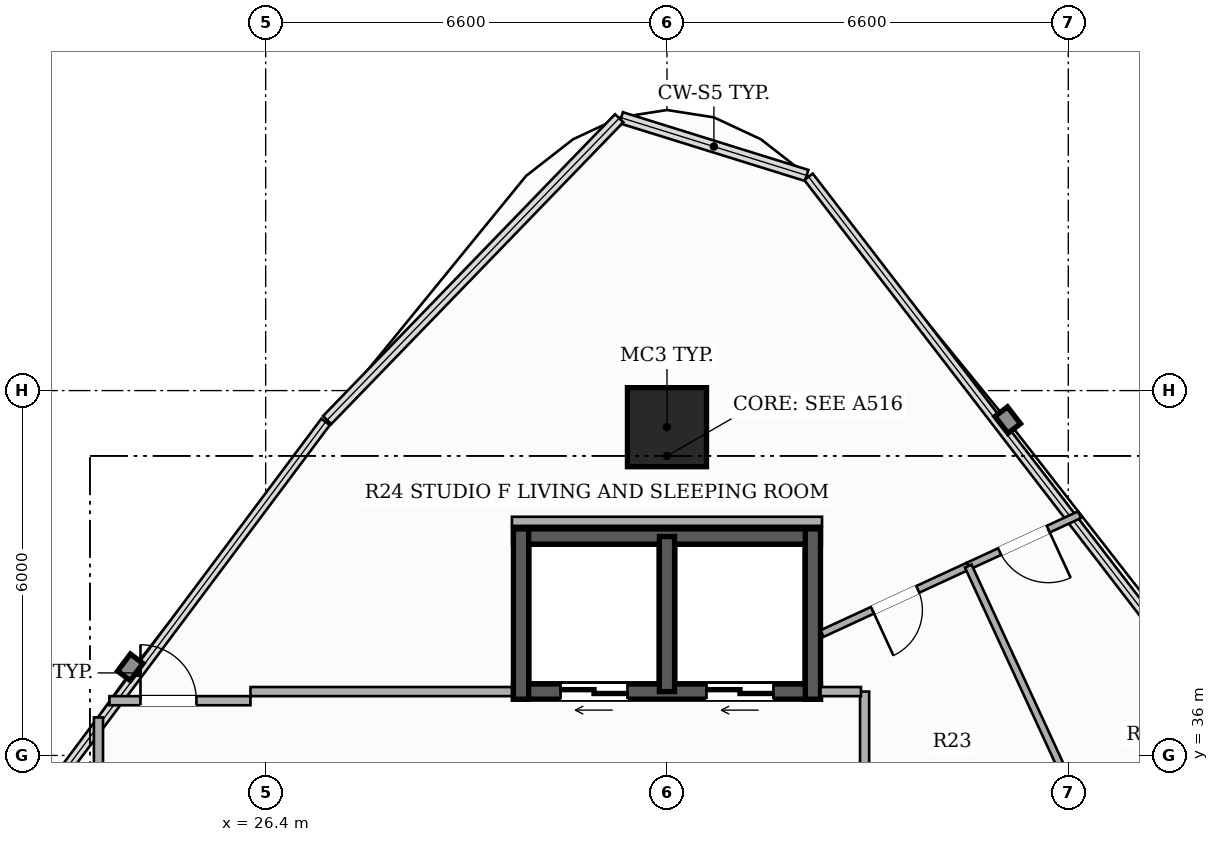
"""IFC4 building model, lengths in metres.
Left out: names, types, materials, properties, quantities, classifications, styles, units other than length and angle.
Written with IfcOpenShell. Run it as: python <this file> out.ifc"""

import sys

from ifc_helpers import new_model, si_unit, direction, frame, frame_2d, origin, origin_2d, place, context, subcontext, project, spatial, rectangle, hollow_rectangle, extrude, element, fill, save


model = new_model("IFC4")
c1 = context("Model", 3, precision=1e-05, world=origin(), true_north=direction((0.0, 1.0)))
c2 = subcontext(c1, "Body", "Model", "MODEL_VIEW")
j1 = project(units=[si_unit("LENGTHUNIT", "METRE"), si_unit("PLANEANGLEUNIT", "RADIAN")], contexts=[c1])
p1 = place(None, origin())
s1 = spatial("IfcSite", under=j1, at=p1, CompositionType="ELEMENT")
p2 = place(p1, origin())
s2 = spatial("IfcBuilding", under=s1, at=p2, CompositionType="ELEMENT")
p3 = place(p2, frame((0.0, 0.0, 199.7)))
s3 = spatial("IfcBuildingStorey", under=s2, at=p3, CompositionType="ELEMENT", Elevation=199.7)
p4 = place(p3, frame((35.525, 37.05, 0.0), z_axis=(0.0, 0.0, 1.0), x_axis=(-1.0, 0.0, 0.0)))
e1 = element("IfcWall", 1, at=p4, inside=s3, PredefinedType="SHEAR", context=c2, shape_type="SweptSolid", body=[
    extrude(rectangle(XDim=5.05, YDim=0.25, at=frame_2d((2.525, 0.0))), origin(), (0.0, 0.0, 1.0), 3.3),
])
p5 = place(p4, frame((3.175, 0.0, 0.0)))
e2 = element("IfcOpeningElement", 2, at=p5, cuts=e1, PredefinedType="OPENING", context=c2, shape_type="SweptSolid", body=[
    extrude(rectangle(XDim=1.1, YDim=2.2, at=frame_2d((0.55, 1.1))), frame((0.0, 0.135, 0.0), z_axis=(0.0, -1.0, 0.0), x_axis=(1.0, 0.0, 0.0)), (0.0, 0.0, 1.0), 0.27),
])
p6 = place(p4, frame((0.775, 0.0, 0.0)))
e3 = element("IfcOpeningElement", 3, at=p6, cuts=e1, PredefinedType="OPENING", context=c2, shape_type="SweptSolid", body=[
    extrude(rectangle(XDim=1.1, YDim=2.2, at=frame_2d((0.55, 1.1))), frame((0.0, 0.135, 0.0), z_axis=(0.0, -1.0, 0.0), x_axis=(1.0, 0.0, 0.0)), (0.0, 0.0, 1.0), 0.27),
])
p7 = place(p3, frame((30.475, 39.6, 0.0), z_axis=(0.0, 0.0, 1.0), x_axis=(1.0, 0.0, 0.0)))
e4 = element("IfcWall", 4, at=p7, inside=s3, PredefinedType="SHEAR", context=c2, shape_type="SweptSolid", body=[
    extrude(rectangle(XDim=5.05, YDim=0.25, at=frame_2d((2.525, 0.0))), origin(), (0.0, 0.0, 1.0), 3.3),
])
for number, where, z_axis, x_axis in (
    (5, (30.6, 36.925, 0.0), (0.0, 0.0, 1.0), (0.0, 1.0, 0.0)),
    (6, (35.4, 36.925, 0.0), (0.0, 0.0, 1.0), (0.0, 1.0, 0.0)),
):
    element("IfcWall", number, at=place(p3, frame(where, z_axis=z_axis, x_axis=x_axis)), inside=s3, PredefinedType="SHEAR", context=c2, shape_type="SweptSolid", body=[
        extrude(rectangle(XDim=2.8, YDim=0.25, at=frame_2d((1.4, 0.0))), origin(), (0.0, 0.0, 1.0), 3.3),
    ])
p8 = place(p3, frame((33.0, 37.05, 0.0), z_axis=(0.0, 0.0, 1.0), x_axis=(0.0, 1.0, 0.0)))
e7 = element("IfcWall", 7, at=p8, inside=s3, PredefinedType="SHEAR", context=c2, shape_type="SweptSolid", body=[
    extrude(rectangle(XDim=2.55, YDim=0.25, at=frame_2d((1.275, 0.0))), origin(), (0.0, 0.0, 1.0), 3.3),
])
p9 = place(p3, frame((33.0, 41.398, 0.0), z_axis=(0.0, 0.0, 1.0), x_axis=(1.0, 0.0, 0.0)))
e8 = element("IfcColumn", 8, at=p9, inside=s3, PredefinedType="COLUMN", context=c2, shape_type="SweptSolid", body=[
    extrude(hollow_rectangle(XDim=1.3, YDim=1.3, WallThickness=0.04, at=origin_2d()), origin(), (0.0, 0.0, 1.0), 3.3),
])
p10 = place(p3, frame((36.25, 34.76, 0.0), z_axis=(0.0, 0.0, 1.0), x_axis=(0.0, 1.0, 0.0)))
e9 = element("IfcWall", 9, at=p10, inside=s3, PredefinedType="PARTITIONING", context=c2, shape_type="SweptSolid", body=[
    extrude(rectangle(XDim=2.29, YDim=0.15, at=frame_2d((1.145, 0.0))), origin(), (0.0, 0.0, 1.0), 2.425),
])
p11 = place(p3, frame((35.525, 37.05, 0.0), z_axis=(0.0, 0.0, 1.0), x_axis=(1.0, 0.0, 0.0)))
e10 = element("IfcWall", 10, at=p11, inside=s3, PredefinedType="PARTITIONING", context=c2, shape_type="SweptSolid", body=[
    extrude(rectangle(XDim=0.665, YDim=0.15, at=frame_2d((0.333, 0.0))), origin(), (0.0, 0.0, 1.0), 2.425),
])
p12 = place(p3, frame((23.65, 23.91, 0.0), z_axis=(0.0, 0.0, 1.0), x_axis=(0.0, 1.0, 0.0)))
e11 = element("IfcWall", 11, at=p12, inside=s3, PredefinedType="PARTITIONING", context=c2, shape_type="SweptSolid", body=[
    extrude(rectangle(XDim=12.715, YDim=0.15, at=frame_2d((6.357, 0.0))), origin(), (0.0, 0.0, 1.0), 2.492),
])
p13 = place(p12, frame((5.917, 0.0, 0.0)))
e12 = element("IfcOpeningElement", 12, at=p13, cuts=e11, PredefinedType="OPENING", context=c2, shape_type="SweptSolid", body=[
    extrude(rectangle(XDim=0.88, YDim=2.1, at=frame_2d((0.44, 1.05))), frame((0.0, 0.085, 0.0), z_axis=(0.0, -1.0, 0.0), x_axis=(1.0, 0.0, 0.0)), (0.0, 0.0, 1.0), 0.17),
])
p14 = place(p3, frame((23.831, 36.9, 0.0), z_axis=(0.0, 0.0, 1.0), x_axis=(1.0, 0.0, 0.0)))
e13 = element("IfcWall", 13, at=p14, inside=s3, PredefinedType="PARTITIONING", context=c2, shape_type="SweptSolid", body=[
    extrude(rectangle(XDim=2.319, YDim=0.15, at=frame_2d((1.159, 0.0))), origin(), (0.0, 0.0, 1.0), 2.619),
])
p15 = place(p14, frame((0.51, 0.0, 0.0)))
e14 = element("IfcOpeningElement", 14, at=p15, cuts=e13, PredefinedType="OPENING", context=c2, shape_type="SweptSolid", body=[
    extrude(rectangle(XDim=0.92, YDim=2.15, at=frame_2d((0.46, 1.075))), frame((0.0, 0.085, 0.0), z_axis=(0.0, -1.0, 0.0), x_axis=(1.0, 0.0, 0.0)), (0.0, 0.0, 1.0), 0.17),
])
p16 = place(p3, frame((26.15, 37.05, 0.0), z_axis=(0.0, 0.0, 1.0), x_axis=(1.0, 0.0, 0.0)))
e15 = element("IfcWall", 15, at=p16, inside=s3, PredefinedType="PARTITIONING", context=c2, shape_type="SweptSolid", body=[
    extrude(rectangle(XDim=4.3, YDim=0.15, at=frame_2d((2.15, 0.0))), origin(), (0.0, 0.0, 1.0), 2.425),
])
p17 = place(p3, frame((30.45, 39.85, 0.0), z_axis=(0.0, 0.0, 1.0), x_axis=(1.0, 0.0, 0.0)))
e16 = element("IfcWall", 16, at=p17, inside=s3, PredefinedType="PARTITIONING", context=c2, shape_type="SweptSolid", body=[
    extrude(rectangle(XDim=5.1, YDim=0.15, at=frame_2d((2.55, 0.0))), origin(), (0.0, 0.0, 1.0), 2.492),
])
p18 = place(p3, frame((37.955, 39.114, 0.0), z_axis=(0.0, 0.0, 1.0), x_axis=(-0.907945896046, -0.41908740121, 0.0)))
e17 = element("IfcWall", 17, at=p18, inside=s3, PredefinedType="PARTITIONING", context=c2, shape_type="SweptSolid", body=[
    extrude(rectangle(XDim=2.649, YDim=0.12, at=frame_2d((1.324, 0.0))), origin(), (0.0, 0.0, 1.0), 2.492),
])
p19 = place(p18, frame((0.914, 0.0, 0.0)))
e18 = element("IfcOpeningElement", 18, at=p19, cuts=e17, PredefinedType="OPENING", context=c2, shape_type="SweptSolid", body=[
    extrude(rectangle(XDim=0.82, YDim=2.1, at=frame_2d((0.41, 1.05))), frame((0.0, 0.07, 0.0), z_axis=(0.0, -1.0, 0.0), x_axis=(1.0, 0.0, 0.0)), (0.0, 0.0, 1.0), 0.14),
])
p20 = place(p3, frame((39.786, 39.959, 0.0), z_axis=(0.0, 0.0, 1.0), x_axis=(-0.90796292821, -0.419050499338, 0.0)))
e19 = element("IfcWall", 19, at=p20, inside=s3, PredefinedType="PARTITIONING", context=c2, shape_type="SweptSolid", body=[
    extrude(rectangle(XDim=2.016, YDim=0.12, at=frame_2d((1.008, 0.0))), origin(), (0.0, 0.0, 1.0), 3.06),
])
p21 = place(p20, frame((0.568, 0.0, 0.0)))
e20 = element("IfcOpeningElement", 20, at=p21, cuts=e19, PredefinedType="OPENING", context=c2, shape_type="SweptSolid", body=[
    extrude(rectangle(XDim=0.88, YDim=2.1, at=frame_2d((0.44, 1.05))), frame((0.0, 0.07, 0.0), z_axis=(0.0, -1.0, 0.0), x_axis=(1.0, 0.0, 0.0)), (0.0, 0.0, 1.0), 0.14),
])
p22 = place(p3, frame((37.955, 39.114, 0.0), z_axis=(0.0, 0.0, 1.0), x_axis=(0.41911319203, -0.907933991139, 0.0)))
e21 = element("IfcWall", 21, at=p22, inside=s3, PredefinedType="PARTITIONING", context=c2, shape_type="SweptSolid", body=[
    extrude(rectangle(XDim=5.628, YDim=0.12, at=frame_2d((2.814, 0.0))), origin(), (0.0, 0.0, 1.0), 2.492),
])
p23 = place(p5, origin())
e22 = element("IfcDoor", 22, at=p23, inside=s3, OperationType="DOUBLE_DOOR_SLIDING", PredefinedType="DOOR", context=c2, shape_type="SweptSolid", body=[
    extrude(rectangle(XDim=1.1, YDim=2.2, at=frame_2d((0.55, 1.1))), frame((0.0, 0.025, 0.0), z_axis=(0.0, -1.0, 0.0), x_axis=(1.0, 0.0, 0.0)), (0.0, 0.0, 1.0), 0.05),
])
fill(e2, e22)
p24 = place(p6, origin())
e23 = element("IfcDoor", 23, at=p24, inside=s3, OperationType="DOUBLE_DOOR_SLIDING", PredefinedType="DOOR", context=c2, shape_type="SweptSolid", body=[
    extrude(rectangle(XDim=1.1, YDim=2.2, at=frame_2d((0.55, 1.1))), frame((0.0, 0.025, 0.0), z_axis=(0.0, -1.0, 0.0), x_axis=(1.0, 0.0, 0.0)), (0.0, 0.0, 1.0), 0.05),
])
fill(e3, e23)
p25 = place(p15, origin())
e24 = element("IfcDoor", 24, at=p25, inside=s3, OperationType="SINGLE_SWING_LEFT", PredefinedType="DOOR", context=c2, shape_type="SweptSolid", body=[
    extrude(rectangle(XDim=0.92, YDim=2.15, at=frame_2d((0.46, 1.075))), frame((0.0, 0.025, 0.0), z_axis=(0.0, -1.0, 0.0), x_axis=(1.0, 0.0, 0.0)), (0.0, 0.0, 1.0), 0.05),
])
fill(e14, e24)
p26 = place(p19, origin())
e25 = element("IfcDoor", 25, at=p26, inside=s3, OperationType="SINGLE_SWING_RIGHT", PredefinedType="DOOR", context=c2, shape_type="SweptSolid", body=[
    extrude(rectangle(XDim=0.82, YDim=2.1, at=frame_2d((0.41, 1.05))), frame((0.0, 0.025, 0.0), z_axis=(0.0, -1.0, 0.0), x_axis=(1.0, 0.0, 0.0)), (0.0, 0.0, 1.0), 0.05),
])
fill(e18, e25)
p27 = place(p21, origin())
e26 = element("IfcDoor", 26, at=p27, inside=s3, OperationType="SINGLE_SWING_LEFT", PredefinedType="DOOR", context=c2, shape_type="SweptSolid", body=[
    extrude(rectangle(XDim=0.88, YDim=2.1, at=frame_2d((0.44, 1.05))), frame((0.0, 0.025, 0.0), z_axis=(0.0, -1.0, 0.0), x_axis=(1.0, 0.0, 0.0)), (0.0, 0.0, 1.0), 0.05),
])
fill(e20, e26)
save(model, sys.argv[1])
